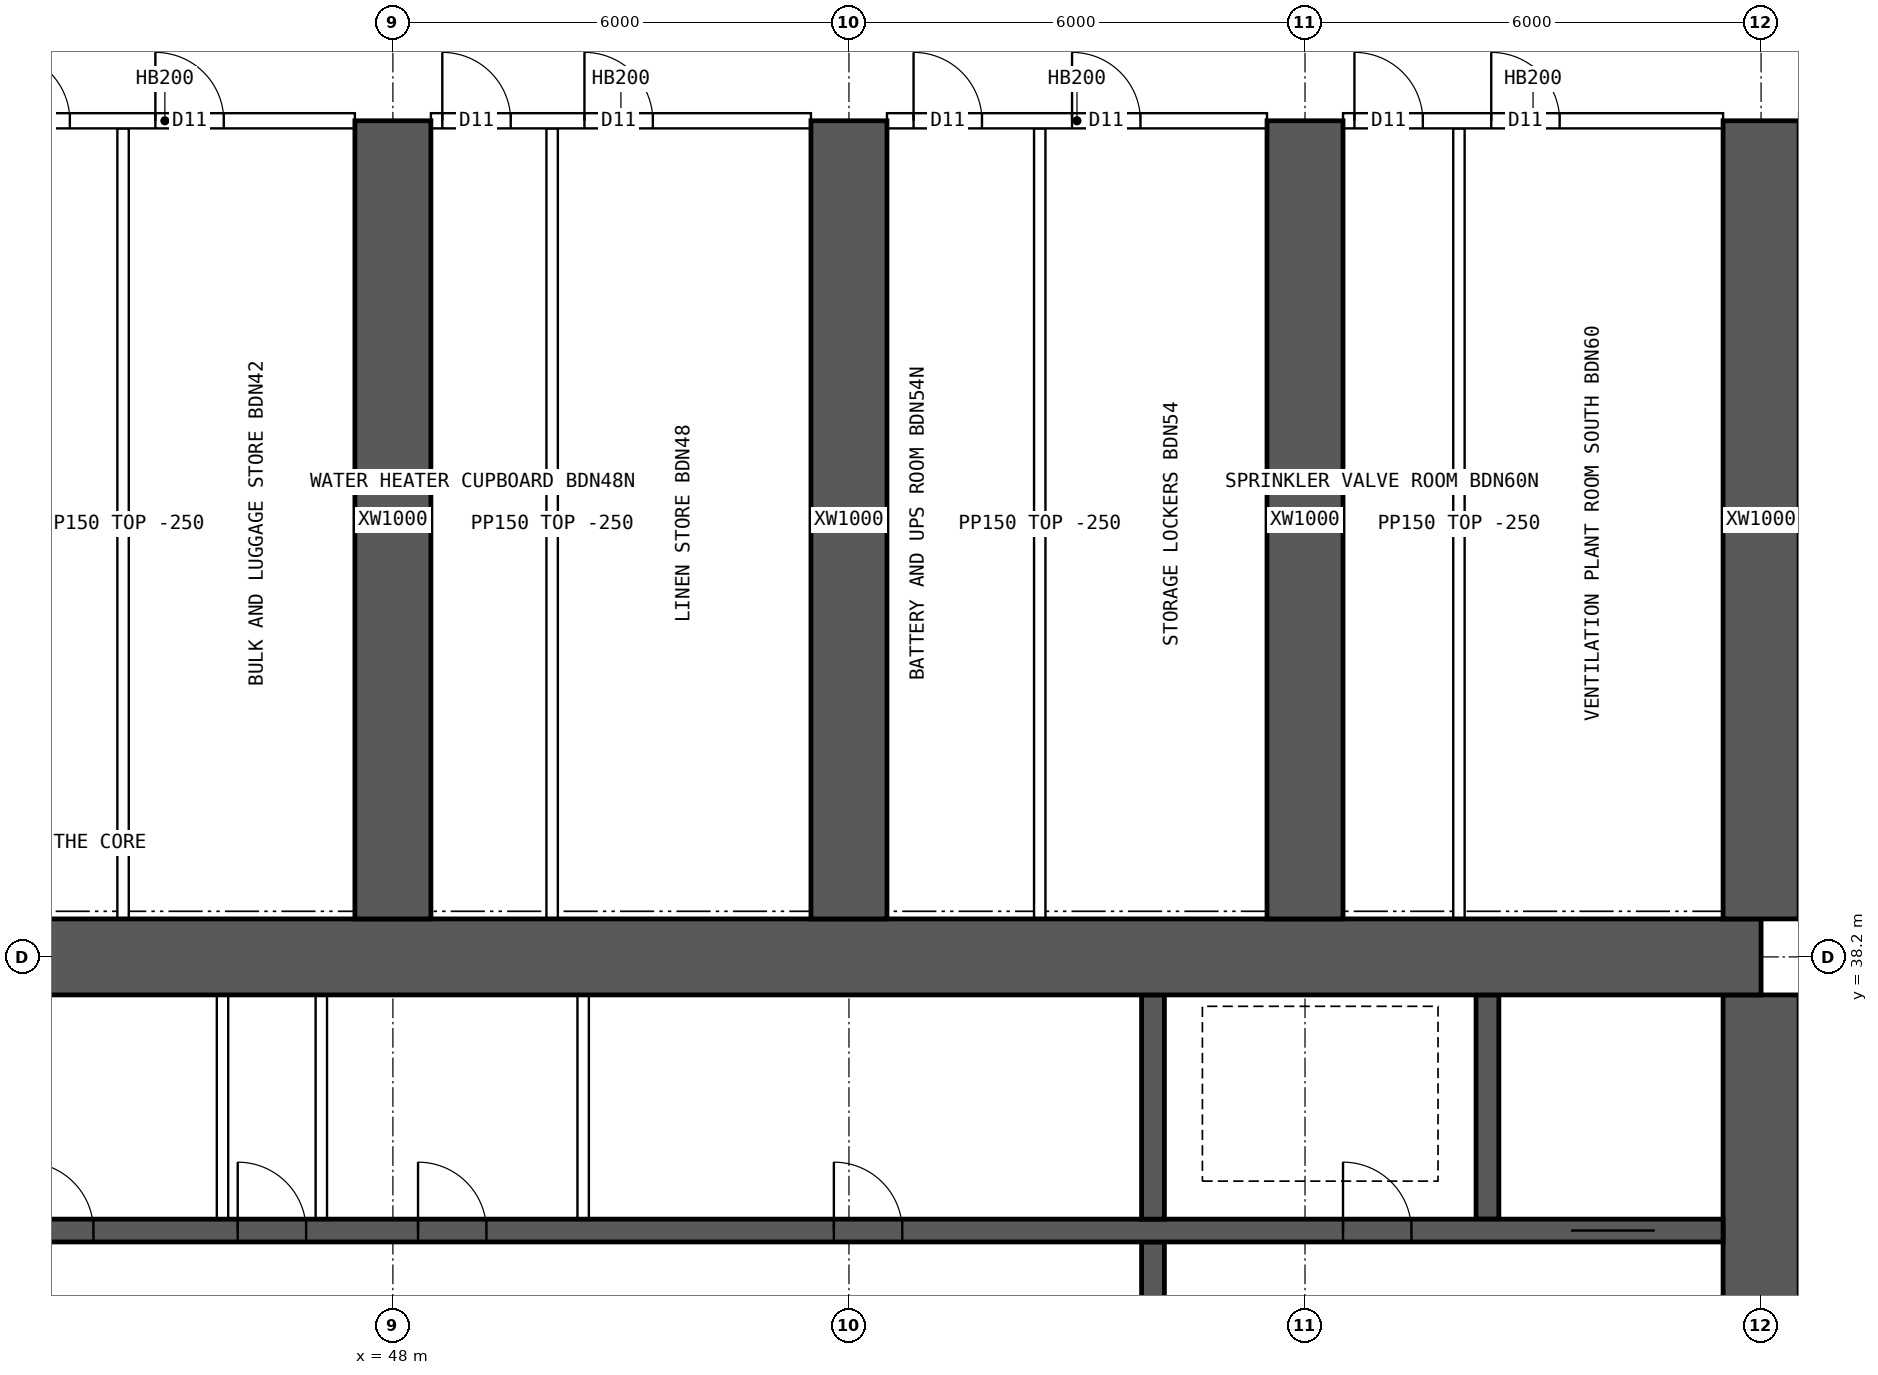
"""IFC4 building model, lengths in metres.
Left out: names, types, materials, properties, quantities, classifications, styles, units other than length and angle.
Written with IfcOpenShell. Run it as: python <this file> out.ifc"""

import sys

from ifc_helpers import new_model, si_unit, direction, frame, frame_2d, origin, place, context, subcontext, project, spatial, rectangle, extrude, element, fill, save


model = new_model("IFC4")
c1 = context("Model", 3, precision=1e-05, world=origin(), true_north=direction((0.0, 1.0)))
c2 = subcontext(c1, "Body", "Model", "MODEL_VIEW")
j1 = project(units=[si_unit("LENGTHUNIT", "METRE"), si_unit("PLANEANGLEUNIT", "RADIAN")], contexts=[c1])
p1 = place(None, origin())
s1 = spatial("IfcSite", under=j1, at=p1, CompositionType="ELEMENT")
p2 = place(p1, origin())
s2 = spatial("IfcBuilding", under=s1, at=p2, CompositionType="ELEMENT")
p3 = place(p2, frame((0.0, 0.0, 61.45)))
s3 = spatial("IfcBuildingStorey", under=s2, at=p3, CompositionType="ELEMENT", Elevation=61.45)
p4 = place(p3, frame((18.0, 38.2, 0.0), z_axis=(0.0, 0.0, 1.0), x_axis=(1.0, 0.0, 0.0)))
e1 = element("IfcWall", 1, at=p4, inside=s3, PredefinedType="SHEAR", context=c2, shape_type="SweptSolid", body=[
    extrude(rectangle(XDim=48.0, YDim=1.0, at=frame_2d((24.0, 0.0))), origin(), (0.0, 0.0, 1.0), 3.75),
])
p5 = place(p3, frame((66.0, 26.3, 0.0), z_axis=(0.0, 0.0, 1.0), x_axis=(0.0, 1.0, 0.0)))
e2 = element("IfcWall", 2, at=p5, inside=s3, PredefinedType="SHEAR", context=c2, shape_type="SweptSolid", body=[
    extrude(rectangle(XDim=11.4, YDim=1.0, at=frame_2d((5.7, 0.0))), origin(), (0.0, 0.0, 1.0), 3.75),
])
p6 = place(p5, frame((5.0, 0.0, 0.0)))
e3 = element("IfcOpeningElement", 3, at=p6, cuts=e2, PredefinedType="OPENING", context=c2, shape_type="SweptSolid", body=[
    extrude(rectangle(XDim=1.2, YDim=2.1, at=frame_2d((0.6, 1.05))), frame((0.0, 0.51, 0.0), z_axis=(0.0, -1.0, 0.0), x_axis=(1.0, 0.0, 0.0)), (0.0, 0.0, 1.0), 1.02),
])
p7 = place(p3, frame((18.5, 34.6, 0.0), z_axis=(0.0, 0.0, 1.0), x_axis=(1.0, 0.0, 0.0)))
e4 = element("IfcWall", 4, at=p7, inside=s3, PredefinedType="SHEAR", context=c2, shape_type="SweptSolid", body=[
    extrude(rectangle(XDim=47.0, YDim=0.3, at=frame_2d((23.5, 0.0))), origin(), (0.0, 0.0, 1.0), 3.75),
])
p8 = place(p7, frame((0.9, 0.0, 0.0)))
e5 = element("IfcOpeningElement", 5, at=p8, cuts=e4, PredefinedType="OPENING", context=c2, shape_type="SweptSolid", body=[
    extrude(rectangle(XDim=1.1, YDim=2.1, at=frame_2d((0.55, 1.05))), frame((0.0, 0.16, 0.0), z_axis=(0.0, -1.0, 0.0), x_axis=(1.0, 0.0, 0.0)), (0.0, 0.0, 1.0), 0.32),
])
p9 = place(p7, frame((45.0, 0.0, 0.0)))
e6 = element("IfcOpeningElement", 6, at=p9, cuts=e4, PredefinedType="OPENING", context=c2, shape_type="SweptSolid", body=[
    extrude(rectangle(XDim=1.1, YDim=2.1, at=frame_2d((0.55, 1.05))), frame((0.0, 0.16, 0.0), z_axis=(0.0, -1.0, 0.0), x_axis=(1.0, 0.0, 0.0)), (0.0, 0.0, 1.0), 0.32),
])
p10 = place(p7, frame((4.1, 0.0, 0.0)))
e7 = element("IfcOpeningElement", 7, at=p10, cuts=e4, PredefinedType="OPENING", context=c2, shape_type="SweptSolid", body=[
    extrude(rectangle(XDim=0.9, YDim=2.1, at=frame_2d((0.45, 1.05))), frame((0.0, 0.16, 0.0), z_axis=(0.0, -1.0, 0.0), x_axis=(1.0, 0.0, 0.0)), (0.0, 0.0, 1.0), 0.32),
])
p11 = place(p7, frame((42.0, 0.0, 0.0)))
e8 = element("IfcOpeningElement", 8, at=p11, cuts=e4, PredefinedType="OPENING", context=c2, shape_type="SweptSolid", body=[
    extrude(rectangle(XDim=0.9, YDim=2.1, at=frame_2d((0.45, 1.05))), frame((0.0, 0.16, 0.0), z_axis=(0.0, -1.0, 0.0), x_axis=(1.0, 0.0, 0.0)), (0.0, 0.0, 1.0), 0.32),
])
p12 = place(p7, frame((8.875, 0.0, 0.0)))
e9 = element("IfcOpeningElement", 9, at=p12, cuts=e4, PredefinedType="OPENING", context=c2, shape_type="SweptSolid", body=[
    extrude(rectangle(XDim=0.9, YDim=2.1, at=frame_2d((0.45, 1.05))), frame((0.0, 0.16, 0.0), z_axis=(0.0, -1.0, 0.0), x_axis=(1.0, 0.0, 0.0)), (0.0, 0.0, 1.0), 0.32),
])
p13 = place(p7, frame((12.849, 0.0, 0.0)))
e10 = element("IfcOpeningElement", 10, at=p13, cuts=e4, PredefinedType="OPENING", context=c2, shape_type="SweptSolid", body=[
    extrude(rectangle(XDim=0.9, YDim=2.1, at=frame_2d((0.45, 1.05))), frame((0.0, 0.16, 0.0), z_axis=(0.0, -1.0, 0.0), x_axis=(1.0, 0.0, 0.0)), (0.0, 0.0, 1.0), 0.32),
])
p14 = place(p7, frame((16.496, 0.0, 0.0)))
e11 = element("IfcOpeningElement", 11, at=p14, cuts=e4, PredefinedType="OPENING", context=c2, shape_type="SweptSolid", body=[
    extrude(rectangle(XDim=0.9, YDim=2.1, at=frame_2d((0.45, 1.05))), frame((0.0, 0.16, 0.0), z_axis=(0.0, -1.0, 0.0), x_axis=(1.0, 0.0, 0.0)), (0.0, 0.0, 1.0), 0.32),
])
p15 = place(p7, frame((20.255, 0.0, 0.0)))
e12 = element("IfcOpeningElement", 12, at=p15, cuts=e4, PredefinedType="OPENING", context=c2, shape_type="SweptSolid", body=[
    extrude(rectangle(XDim=0.9, YDim=2.1, at=frame_2d((0.45, 1.05))), frame((0.0, 0.16, 0.0), z_axis=(0.0, -1.0, 0.0), x_axis=(1.0, 0.0, 0.0)), (0.0, 0.0, 1.0), 0.32),
])
p16 = place(p7, frame((24.661, 0.0, 0.0)))
e13 = element("IfcOpeningElement", 13, at=p16, cuts=e4, PredefinedType="OPENING", context=c2, shape_type="SweptSolid", body=[
    extrude(rectangle(XDim=0.9, YDim=2.1, at=frame_2d((0.45, 1.05))), frame((0.0, 0.16, 0.0), z_axis=(0.0, -1.0, 0.0), x_axis=(1.0, 0.0, 0.0)), (0.0, 0.0, 1.0), 0.32),
])
p17 = place(p7, frame((27.458, 0.0, 0.0)))
e14 = element("IfcOpeningElement", 14, at=p17, cuts=e4, PredefinedType="OPENING", context=c2, shape_type="SweptSolid", body=[
    extrude(rectangle(XDim=0.9, YDim=2.1, at=frame_2d((0.45, 1.05))), frame((0.0, 0.16, 0.0), z_axis=(0.0, -1.0, 0.0), x_axis=(1.0, 0.0, 0.0)), (0.0, 0.0, 1.0), 0.32),
])
p18 = place(p7, frame((29.831, 0.0, 0.0)))
e15 = element("IfcOpeningElement", 15, at=p18, cuts=e4, PredefinedType="OPENING", context=c2, shape_type="SweptSolid", body=[
    extrude(rectangle(XDim=0.9, YDim=2.1, at=frame_2d((0.45, 1.05))), frame((0.0, 0.16, 0.0), z_axis=(0.0, -1.0, 0.0), x_axis=(1.0, 0.0, 0.0)), (0.0, 0.0, 1.0), 0.32),
])
p19 = place(p7, frame((35.302, 0.0, 0.0)))
e16 = element("IfcOpeningElement", 16, at=p19, cuts=e4, PredefinedType="OPENING", context=c2, shape_type="SweptSolid", body=[
    extrude(rectangle(XDim=0.9, YDim=2.1, at=frame_2d((0.45, 1.05))), frame((0.0, 0.16, 0.0), z_axis=(0.0, -1.0, 0.0), x_axis=(1.0, 0.0, 0.0)), (0.0, 0.0, 1.0), 0.32),
])
p20 = place(p3, frame((58.0, 30.55, 0.0), z_axis=(0.0, 0.0, 1.0), x_axis=(0.0, 1.0, 0.0)))
e17 = element("IfcWall", 17, at=p20, inside=s3, PredefinedType="SHEAR", context=c2, shape_type="SweptSolid", body=[
    extrude(rectangle(XDim=3.9, YDim=0.3, at=frame_2d((1.95, 0.0))), origin(), (0.0, 0.0, 1.0), 3.75),
])
p21 = place(p20, frame((1.4, 0.0, 0.0)))
e18 = element("IfcOpeningElement", 18, at=p21, cuts=e17, PredefinedType="OPENING", context=c2, shape_type="SweptSolid", body=[
    extrude(rectangle(XDim=1.2, YDim=2.1, at=frame_2d((0.6, 1.05))), frame((0.0, 0.16, 0.0), z_axis=(0.0, -1.0, 0.0), x_axis=(1.0, 0.0, 0.0)), (0.0, 0.0, 1.0), 0.32),
])
for number, where, z_axis, x_axis in (
    (19, (62.4, 34.75, 0.0), (0.0, 0.0, 1.0), (0.0, 1.0, 0.0)),
    (20, (58.0, 34.75, 0.0), (0.0, 0.0, 1.0), (0.0, 1.0, 0.0)),
):
    element("IfcWall", number, at=place(p3, frame(where, z_axis=z_axis, x_axis=x_axis)), inside=s3, PredefinedType="SHEAR", context=c2, shape_type="SweptSolid", body=[
        extrude(rectangle(XDim=2.95, YDim=0.3, at=frame_2d((1.475, 0.0))), origin(), (0.0, 0.0, 1.0), 3.75),
    ])
for number, where, z_axis, x_axis in (
    (21, (48.0, 38.7, 0.0), (0.0, 0.0, 1.0), (0.0, 1.0, 0.0)),
    (22, (54.0, 38.7, 0.0), (0.0, 0.0, 1.0), (0.0, 1.0, 0.0)),
    (23, (60.0, 38.7, 0.0), (0.0, 0.0, 1.0), (0.0, 1.0, 0.0)),
    (24, (66.0, 38.7, 0.0), (0.0, 0.0, 1.0), (0.0, 1.0, 0.0)),
):
    element("IfcWall", number, at=place(p3, frame(where, z_axis=z_axis, x_axis=x_axis)), inside=s3, PredefinedType="SHEAR", context=c2, shape_type="SweptSolid", body=[
        extrude(rectangle(XDim=10.5, YDim=1.0, at=frame_2d((5.25, 0.0))), origin(), (0.0, 0.0, 1.0), 3.75),
    ])
for number, where, z_axis, x_axis in (
    (25, (45.758, 34.75, 0.0), (0.0, 0.0, 1.0), (0.0, 1.0, 0.0)),
    (26, (47.058, 34.75, 0.0), (0.0, 0.0, 1.0), (0.0, 1.0, 0.0)),
    (27, (50.503, 34.75, 0.0), (0.0, 0.0, 1.0), (0.0, 1.0, 0.0)),
):
    element("IfcWall", number, at=place(p3, frame(where, z_axis=z_axis, x_axis=x_axis)), inside=s3, PredefinedType="SOLIDWALL", context=c2, shape_type="SweptSolid", body=[
        extrude(rectangle(XDim=2.95, YDim=0.15, at=frame_2d((1.475, 0.0))), origin(), (0.0, 0.0, 1.0), 3.5),
    ])
p22 = place(p3, frame((42.5, 49.2, 0.0), z_axis=(0.0, 0.0, 1.0), x_axis=(1.0, 0.0, 0.0)))
e28 = element("IfcWall", 28, at=p22, inside=s3, PredefinedType="SOLIDWALL", context=c2, shape_type="SweptSolid", body=[
    extrude(rectangle(XDim=5.0, YDim=0.2, at=frame_2d((2.5, 0.0))), origin(), (0.0, 0.0, 1.0), 3.5),
])
p23 = place(p22, frame((0.35, 0.0, 0.0)))
e29 = element("IfcOpeningElement", 29, at=p23, cuts=e28, PredefinedType="OPENING", context=c2, shape_type="SweptSolid", body=[
    extrude(rectangle(XDim=0.9, YDim=2.1, at=frame_2d((0.45, 1.05))), frame((0.0, 0.11, 0.0), z_axis=(0.0, -1.0, 0.0), x_axis=(1.0, 0.0, 0.0)), (0.0, 0.0, 1.0), 0.22),
])
p24 = place(p22, frame((2.375, 0.0, 0.0)))
e30 = element("IfcOpeningElement", 30, at=p24, cuts=e28, PredefinedType="OPENING", context=c2, shape_type="SweptSolid", body=[
    extrude(rectangle(XDim=0.9, YDim=2.1, at=frame_2d((0.45, 1.05))), frame((0.0, 0.11, 0.0), z_axis=(0.0, -1.0, 0.0), x_axis=(1.0, 0.0, 0.0)), (0.0, 0.0, 1.0), 0.22),
])
p25 = place(p3, frame((48.5, 49.2, 0.0), z_axis=(0.0, 0.0, 1.0), x_axis=(1.0, 0.0, 0.0)))
e31 = element("IfcWall", 31, at=p25, inside=s3, PredefinedType="SOLIDWALL", context=c2, shape_type="SweptSolid", body=[
    extrude(rectangle(XDim=5.0, YDim=0.2, at=frame_2d((2.5, 0.0))), origin(), (0.0, 0.0, 1.0), 3.5),
])
p26 = place(p25, frame((0.15, 0.0, 0.0)))
e32 = element("IfcOpeningElement", 32, at=p26, cuts=e31, PredefinedType="OPENING", context=c2, shape_type="SweptSolid", body=[
    extrude(rectangle(XDim=0.9, YDim=2.1, at=frame_2d((0.45, 1.05))), frame((0.0, 0.11, 0.0), z_axis=(0.0, -1.0, 0.0), x_axis=(1.0, 0.0, 0.0)), (0.0, 0.0, 1.0), 0.22),
])
p27 = place(p25, frame((2.02, 0.0, 0.0)))
e33 = element("IfcOpeningElement", 33, at=p27, cuts=e31, PredefinedType="OPENING", context=c2, shape_type="SweptSolid", body=[
    extrude(rectangle(XDim=0.9, YDim=2.1, at=frame_2d((0.45, 1.05))), frame((0.0, 0.11, 0.0), z_axis=(0.0, -1.0, 0.0), x_axis=(1.0, 0.0, 0.0)), (0.0, 0.0, 1.0), 0.22),
])
p28 = place(p3, frame((54.5, 49.2, 0.0), z_axis=(0.0, 0.0, 1.0), x_axis=(1.0, 0.0, 0.0)))
e34 = element("IfcWall", 34, at=p28, inside=s3, PredefinedType="SOLIDWALL", context=c2, shape_type="SweptSolid", body=[
    extrude(rectangle(XDim=5.0, YDim=0.2, at=frame_2d((2.5, 0.0))), origin(), (0.0, 0.0, 1.0), 3.5),
])
p29 = place(p28, frame((0.35, 0.0, 0.0)))
e35 = element("IfcOpeningElement", 35, at=p29, cuts=e34, PredefinedType="OPENING", context=c2, shape_type="SweptSolid", body=[
    extrude(rectangle(XDim=0.9, YDim=2.1, at=frame_2d((0.45, 1.05))), frame((0.0, 0.11, 0.0), z_axis=(0.0, -1.0, 0.0), x_axis=(1.0, 0.0, 0.0)), (0.0, 0.0, 1.0), 0.22),
])
p30 = place(p28, frame((2.435, 0.0, 0.0)))
e36 = element("IfcOpeningElement", 36, at=p30, cuts=e34, PredefinedType="OPENING", context=c2, shape_type="SweptSolid", body=[
    extrude(rectangle(XDim=0.9, YDim=2.1, at=frame_2d((0.45, 1.05))), frame((0.0, 0.11, 0.0), z_axis=(0.0, -1.0, 0.0), x_axis=(1.0, 0.0, 0.0)), (0.0, 0.0, 1.0), 0.22),
])
p31 = place(p3, frame((60.5, 49.2, 0.0), z_axis=(0.0, 0.0, 1.0), x_axis=(1.0, 0.0, 0.0)))
e37 = element("IfcWall", 37, at=p31, inside=s3, PredefinedType="SOLIDWALL", context=c2, shape_type="SweptSolid", body=[
    extrude(rectangle(XDim=5.0, YDim=0.2, at=frame_2d((2.5, 0.0))), origin(), (0.0, 0.0, 1.0), 3.5),
])
p32 = place(p31, frame((0.15, 0.0, 0.0)))
e38 = element("IfcOpeningElement", 38, at=p32, cuts=e37, PredefinedType="OPENING", context=c2, shape_type="SweptSolid", body=[
    extrude(rectangle(XDim=0.9, YDim=2.1, at=frame_2d((0.45, 1.05))), frame((0.0, 0.11, 0.0), z_axis=(0.0, -1.0, 0.0), x_axis=(1.0, 0.0, 0.0)), (0.0, 0.0, 1.0), 0.22),
])
p33 = place(p31, frame((1.95, 0.0, 0.0)))
e39 = element("IfcOpeningElement", 39, at=p33, cuts=e37, PredefinedType="OPENING", context=c2, shape_type="SweptSolid", body=[
    extrude(rectangle(XDim=0.9, YDim=2.1, at=frame_2d((0.45, 1.05))), frame((0.0, 0.11, 0.0), z_axis=(0.0, -1.0, 0.0), x_axis=(1.0, 0.0, 0.0)), (0.0, 0.0, 1.0), 0.22),
])
for number, where, z_axis, x_axis in (
    (40, (44.45, 38.7, 0.0), (0.0, 0.0, 1.0), (0.0, 1.0, 0.0)),
    (41, (50.095, 38.7, 0.0), (0.0, 0.0, 1.0), (0.0, 1.0, 0.0)),
    (42, (56.51, 38.7, 0.0), (0.0, 0.0, 1.0), (0.0, 1.0, 0.0)),
    (43, (62.025, 38.7, 0.0), (0.0, 0.0, 1.0), (0.0, 1.0, 0.0)),
):
    element("IfcWall", number, at=place(p3, frame(where, z_axis=z_axis, x_axis=x_axis)), inside=s3, PredefinedType="PARTITIONING", context=c2, shape_type="SweptSolid", body=[
        extrude(rectangle(XDim=10.4, YDim=0.15, at=frame_2d((5.2, 0.0))), origin(), (0.0, 0.0, 1.0), 3.5),
    ])
p34 = place(p9, origin())
e44 = element("IfcDoor", 44, at=p34, inside=s3, OperationType="DOUBLE_DOOR_SLIDING", PredefinedType="DOOR", context=c2, shape_type="SweptSolid", body=[
    extrude(rectangle(XDim=1.1, YDim=2.1, at=frame_2d((0.55, 1.05))), frame((0.0, 0.025, 0.0), z_axis=(0.0, -1.0, 0.0), x_axis=(1.0, 0.0, 0.0)), (0.0, 0.0, 1.0), 0.05),
])
fill(e6, e44)
p35 = place(p11, origin())
e45 = element("IfcDoor", 45, at=p35, inside=s3, OperationType="SINGLE_SWING_LEFT", PredefinedType="DOOR", context=c2, shape_type="SweptSolid", body=[
    extrude(rectangle(XDim=0.9, YDim=2.1, at=frame_2d((0.45, 1.05))), frame((0.0, 0.025, 0.0), z_axis=(0.0, -1.0, 0.0), x_axis=(1.0, 0.0, 0.0)), (0.0, 0.0, 1.0), 0.05),
])
fill(e8, e45)
p36 = place(p16, origin())
e46 = element("IfcDoor", 46, at=p36, inside=s3, OperationType="SINGLE_SWING_LEFT", PredefinedType="DOOR", context=c2, shape_type="SweptSolid", body=[
    extrude(rectangle(XDim=0.9, YDim=2.1, at=frame_2d((0.45, 1.05))), frame((0.0, 0.025, 0.0), z_axis=(0.0, -1.0, 0.0), x_axis=(1.0, 0.0, 0.0)), (0.0, 0.0, 1.0), 0.05),
])
fill(e13, e46)
p37 = place(p17, origin())
e47 = element("IfcDoor", 47, at=p37, inside=s3, OperationType="SINGLE_SWING_LEFT", PredefinedType="DOOR", context=c2, shape_type="SweptSolid", body=[
    extrude(rectangle(XDim=0.9, YDim=2.1, at=frame_2d((0.45, 1.05))), frame((0.0, 0.025, 0.0), z_axis=(0.0, -1.0, 0.0), x_axis=(1.0, 0.0, 0.0)), (0.0, 0.0, 1.0), 0.05),
])
fill(e14, e47)
p38 = place(p18, origin())
e48 = element("IfcDoor", 48, at=p38, inside=s3, OperationType="SINGLE_SWING_LEFT", PredefinedType="DOOR", context=c2, shape_type="SweptSolid", body=[
    extrude(rectangle(XDim=0.9, YDim=2.1, at=frame_2d((0.45, 1.05))), frame((0.0, 0.025, 0.0), z_axis=(0.0, -1.0, 0.0), x_axis=(1.0, 0.0, 0.0)), (0.0, 0.0, 1.0), 0.05),
])
fill(e15, e48)
p39 = place(p19, origin())
e49 = element("IfcDoor", 49, at=p39, inside=s3, OperationType="SINGLE_SWING_LEFT", PredefinedType="DOOR", context=c2, shape_type="SweptSolid", body=[
    extrude(rectangle(XDim=0.9, YDim=2.1, at=frame_2d((0.45, 1.05))), frame((0.0, 0.025, 0.0), z_axis=(0.0, -1.0, 0.0), x_axis=(1.0, 0.0, 0.0)), (0.0, 0.0, 1.0), 0.05),
])
fill(e16, e49)
p40 = place(p23, origin())
e50 = element("IfcDoor", 50, at=p40, inside=s3, OperationType="SINGLE_SWING_LEFT", PredefinedType="DOOR", context=c2, shape_type="SweptSolid", body=[
    extrude(rectangle(XDim=0.9, YDim=2.1, at=frame_2d((0.45, 1.05))), frame((0.0, 0.025, 0.0), z_axis=(0.0, -1.0, 0.0), x_axis=(1.0, 0.0, 0.0)), (0.0, 0.0, 1.0), 0.05),
])
fill(e29, e50)
p41 = place(p24, origin())
e51 = element("IfcDoor", 51, at=p41, inside=s3, OperationType="SINGLE_SWING_LEFT", PredefinedType="DOOR", context=c2, shape_type="SweptSolid", body=[
    extrude(rectangle(XDim=0.9, YDim=2.1, at=frame_2d((0.45, 1.05))), frame((0.0, 0.025, 0.0), z_axis=(0.0, -1.0, 0.0), x_axis=(1.0, 0.0, 0.0)), (0.0, 0.0, 1.0), 0.05),
])
fill(e30, e51)
p42 = place(p26, origin())
e52 = element("IfcDoor", 52, at=p42, inside=s3, OperationType="SINGLE_SWING_LEFT", PredefinedType="DOOR", context=c2, shape_type="SweptSolid", body=[
    extrude(rectangle(XDim=0.9, YDim=2.1, at=frame_2d((0.45, 1.05))), frame((0.0, 0.025, 0.0), z_axis=(0.0, -1.0, 0.0), x_axis=(1.0, 0.0, 0.0)), (0.0, 0.0, 1.0), 0.05),
])
fill(e32, e52)
p43 = place(p27, origin())
e53 = element("IfcDoor", 53, at=p43, inside=s3, OperationType="SINGLE_SWING_LEFT", PredefinedType="DOOR", context=c2, shape_type="SweptSolid", body=[
    extrude(rectangle(XDim=0.9, YDim=2.1, at=frame_2d((0.45, 1.05))), frame((0.0, 0.025, 0.0), z_axis=(0.0, -1.0, 0.0), x_axis=(1.0, 0.0, 0.0)), (0.0, 0.0, 1.0), 0.05),
])
fill(e33, e53)
p44 = place(p29, origin())
e54 = element("IfcDoor", 54, at=p44, inside=s3, OperationType="SINGLE_SWING_LEFT", PredefinedType="DOOR", context=c2, shape_type="SweptSolid", body=[
    extrude(rectangle(XDim=0.9, YDim=2.1, at=frame_2d((0.45, 1.05))), frame((0.0, 0.025, 0.0), z_axis=(0.0, -1.0, 0.0), x_axis=(1.0, 0.0, 0.0)), (0.0, 0.0, 1.0), 0.05),
])
fill(e35, e54)
p45 = place(p30, origin())
e55 = element("IfcDoor", 55, at=p45, inside=s3, OperationType="SINGLE_SWING_LEFT", PredefinedType="DOOR", context=c2, shape_type="SweptSolid", body=[
    extrude(rectangle(XDim=0.9, YDim=2.1, at=frame_2d((0.45, 1.05))), frame((0.0, 0.025, 0.0), z_axis=(0.0, -1.0, 0.0), x_axis=(1.0, 0.0, 0.0)), (0.0, 0.0, 1.0), 0.05),
])
fill(e36, e55)
p46 = place(p32, origin())
e56 = element("IfcDoor", 56, at=p46, inside=s3, OperationType="SINGLE_SWING_LEFT", PredefinedType="DOOR", context=c2, shape_type="SweptSolid", body=[
    extrude(rectangle(XDim=0.9, YDim=2.1, at=frame_2d((0.45, 1.05))), frame((0.0, 0.025, 0.0), z_axis=(0.0, -1.0, 0.0), x_axis=(1.0, 0.0, 0.0)), (0.0, 0.0, 1.0), 0.05),
])
fill(e38, e56)
p47 = place(p33, origin())
e57 = element("IfcDoor", 57, at=p47, inside=s3, OperationType="SINGLE_SWING_LEFT", PredefinedType="DOOR", context=c2, shape_type="SweptSolid", body=[
    extrude(rectangle(XDim=0.9, YDim=2.1, at=frame_2d((0.45, 1.05))), frame((0.0, 0.025, 0.0), z_axis=(0.0, -1.0, 0.0), x_axis=(1.0, 0.0, 0.0)), (0.0, 0.0, 1.0), 0.05),
])
fill(e39, e57)
save(model, sys.argv[1])
